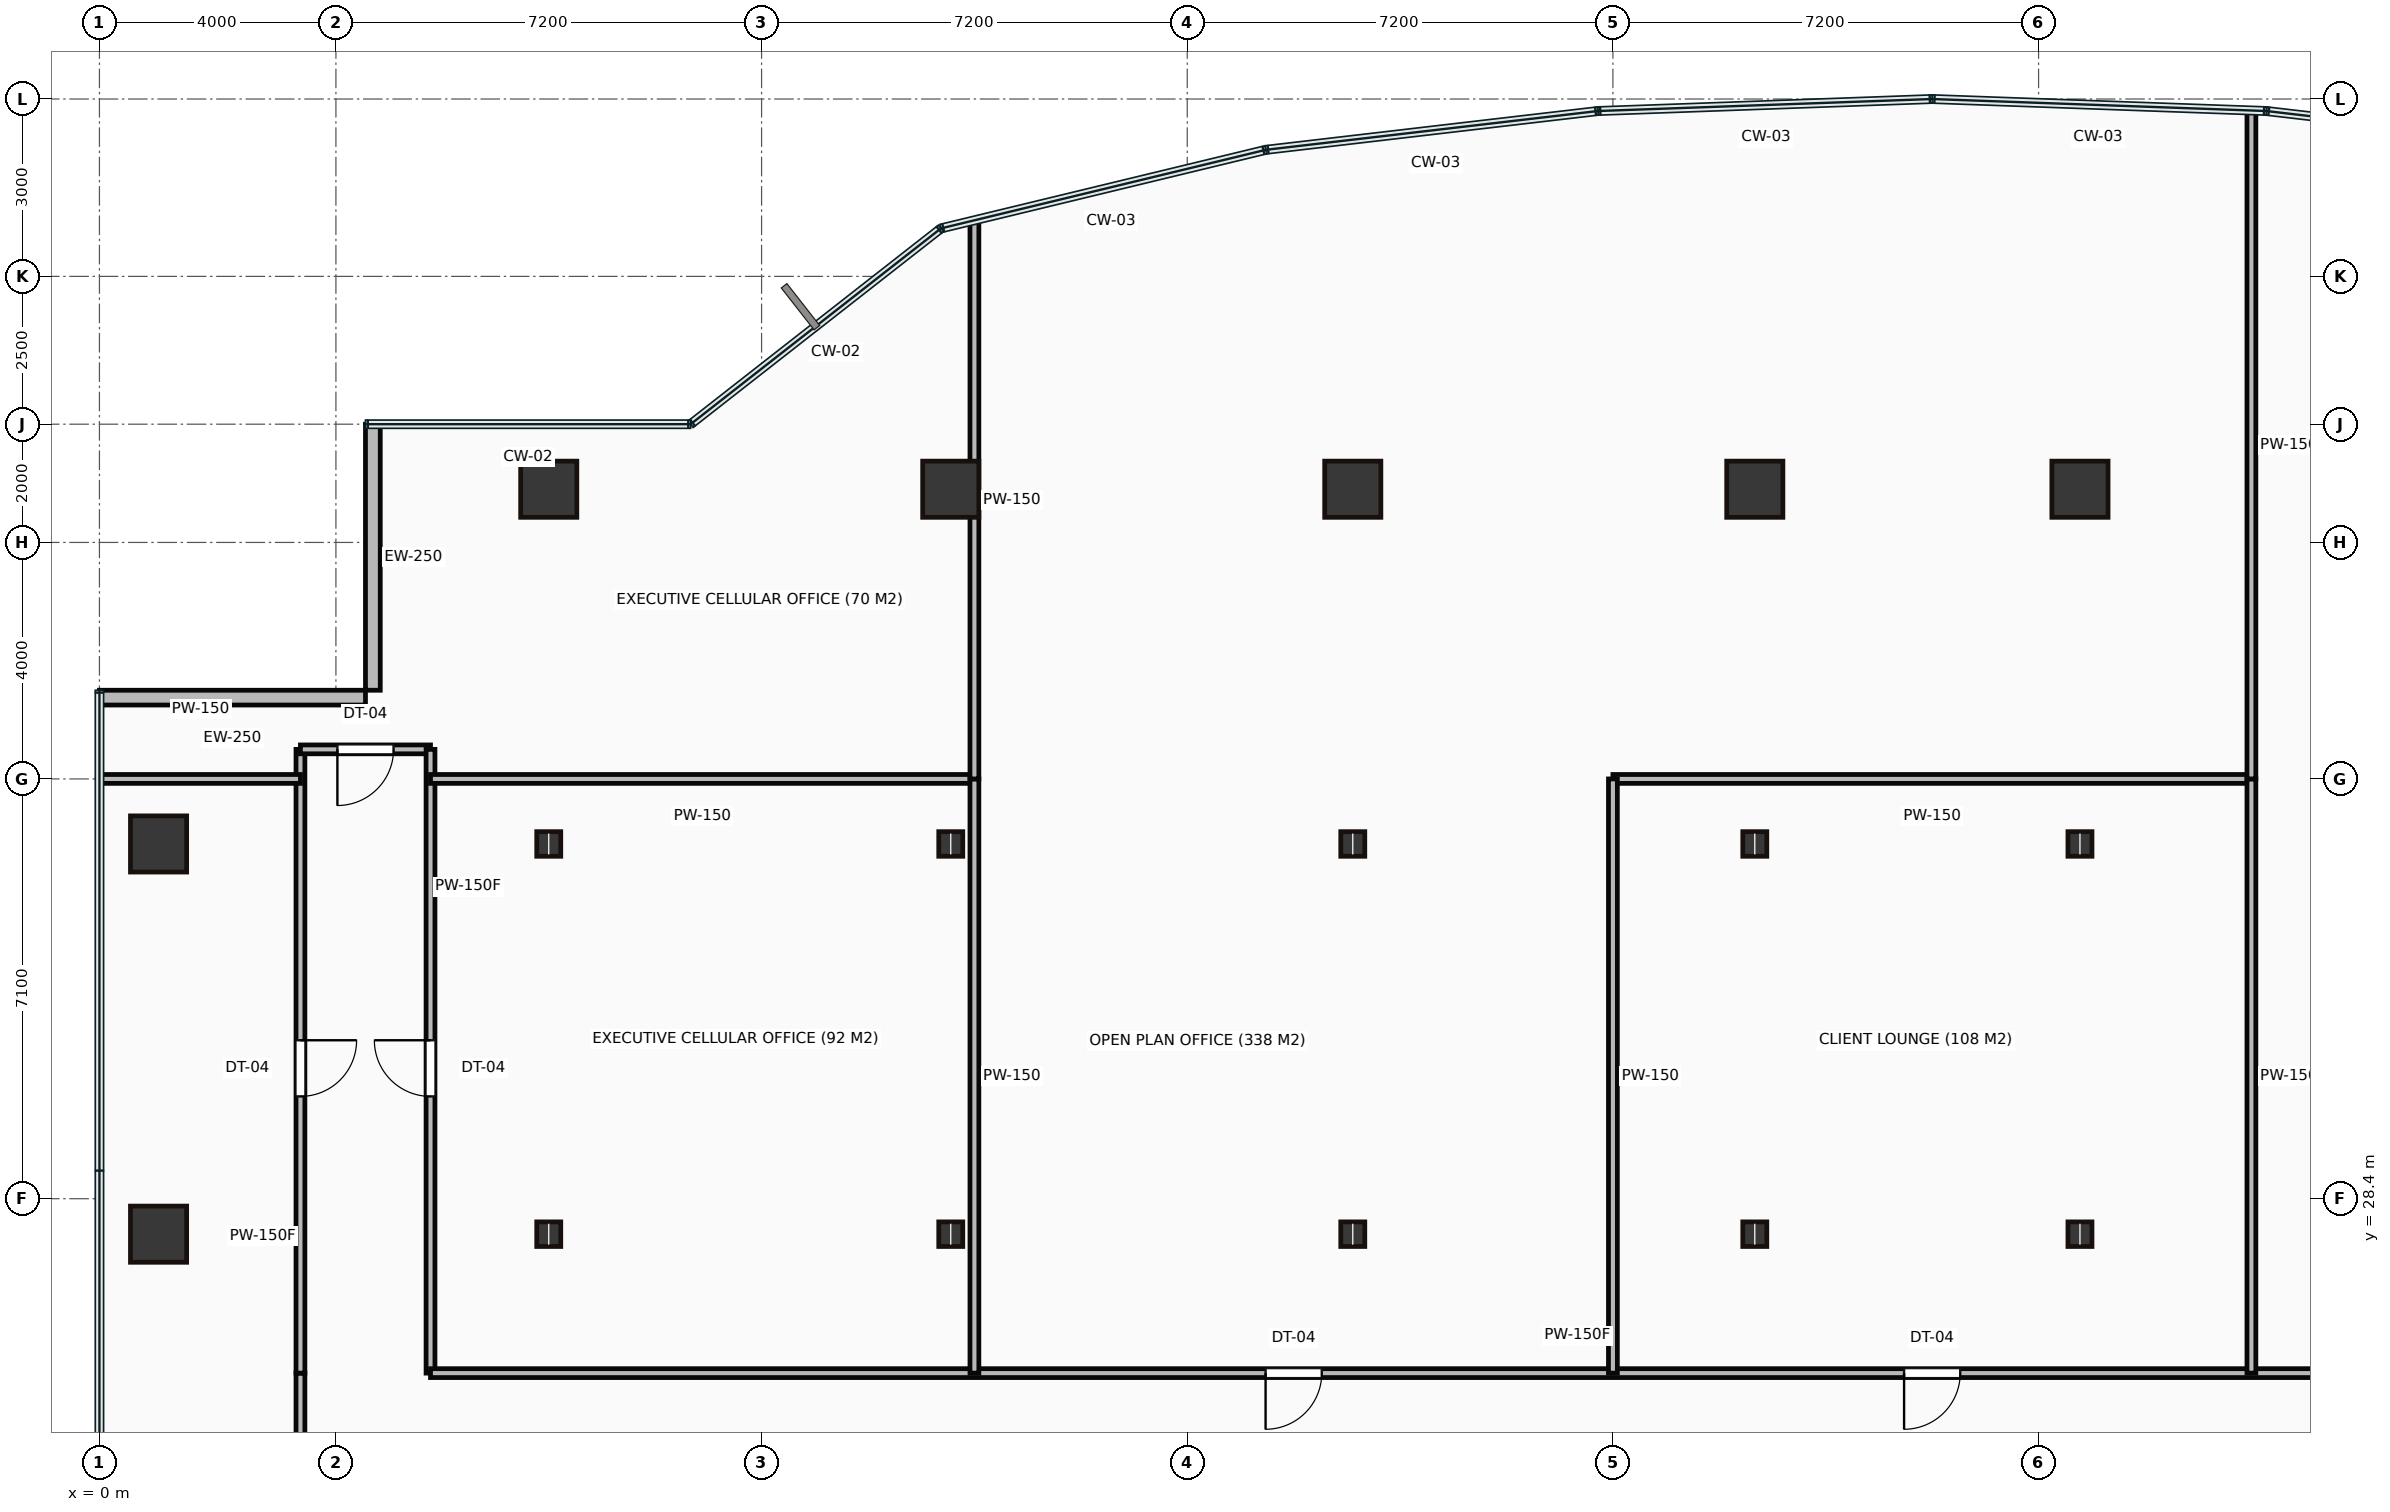
"""IFC4 building model, lengths in metres.
Left out: names, types, materials, properties, quantities, classifications, styles, units other than length and angle.
Written with IfcOpenShell. Run it as: python <this file> out.ifc"""

import sys

from ifc_helpers import new_model, si_unit, direction, frame, frame_2d, origin, origin_2d, place, context, subcontext, project, spatial, rectangle, hollow_rectangle, i_section, extrude, source, transform, mapped, element, fill, save


model = new_model("IFC4")
c1 = context("Model", 3, precision=1e-05, world=origin(), true_north=direction((0.0, 1.0)))
c2 = subcontext(c1, "Body", "Model", "MODEL_VIEW")
j1 = project(units=[si_unit("LENGTHUNIT", "METRE"), si_unit("PLANEANGLEUNIT", "RADIAN")], contexts=[c1])
p1 = place(None, origin())
s1 = spatial("IfcSite", under=j1, at=p1, CompositionType="ELEMENT")
p2 = place(p1, origin())
s2 = spatial("IfcBuilding", under=s1, at=p2, CompositionType="ELEMENT")
p3 = place(p2, frame((0.0, 0.0, 50.75)))
s3 = spatial("IfcBuildingStorey", under=s2, at=p3, CompositionType="ELEMENT", Elevation=50.75)
m1 = source(origin(), c2, "Body", "SweptSolid", [
    extrude(hollow_rectangle(XDim=0.95, YDim=0.95, WallThickness=0.045, at=origin_2d()), origin(), (0.0, 0.0, 1.0), 3.65),
])
for number, where, z_axis, x_axis in (
    (1, (1.0, 27.8, 0.0), (0.0, 0.0, 1.0), (1.0, 0.0, 0.0)),
    (2, (1.0, 34.4, 0.0), (0.0, 0.0, 1.0), (1.0, 0.0, 0.0)),
):
    element("IfcColumn", number, at=place(p3, frame(where, z_axis=z_axis, x_axis=x_axis)), inside=s3, PredefinedType="COLUMN", context=c2, shape_type="MappedRepresentation", body=[
        mapped(m1, transform((0.0, 0.0, 0.0))),
    ])
m2 = source(origin(), c2, "Body", "SweptSolid", [
    extrude(i_section(OverallWidth=0.406, OverallDepth=0.416, WebThickness=0.03, FlangeThickness=0.048, at=origin_2d()), origin(), (0.0, 0.0, 1.0), 3.65),
])
for number, where, z_axis, x_axis in (
    (3, (7.6, 27.8, 0.0), (0.0, 0.0, 1.0), (1.0, 0.0, 0.0)),
    (4, (7.6, 34.4, 0.0), (0.0, 0.0, 1.0), (1.0, 0.0, 0.0)),
):
    element("IfcColumn", number, at=place(p3, frame(where, z_axis=z_axis, x_axis=x_axis)), inside=s3, PredefinedType="COLUMN", context=c2, shape_type="MappedRepresentation", body=[
        mapped(m2, transform((0.0, 0.0, 0.0))),
    ])
p4 = place(p3, frame((7.6, 40.4, 0.0), z_axis=(0.0, 0.0, 1.0), x_axis=(1.0, 0.0, 0.0)))
e5 = element("IfcColumn", 5, at=p4, inside=s3, PredefinedType="COLUMN", context=c2, shape_type="MappedRepresentation", body=[
    mapped(m1, transform((0.0, 0.0, 0.0))),
])
for number, where, z_axis, x_axis in (
    (6, (14.4, 27.8, 0.0), (0.0, 0.0, 1.0), (1.0, 0.0, 0.0)),
    (7, (14.4, 34.4, 0.0), (0.0, 0.0, 1.0), (1.0, 0.0, 0.0)),
):
    element("IfcColumn", number, at=place(p3, frame(where, z_axis=z_axis, x_axis=x_axis)), inside=s3, PredefinedType="COLUMN", context=c2, shape_type="MappedRepresentation", body=[
        mapped(m2, transform((0.0, 0.0, 0.0))),
    ])
p5 = place(p3, frame((14.4, 40.4, 0.0), z_axis=(0.0, 0.0, 1.0), x_axis=(1.0, 0.0, 0.0)))
e8 = element("IfcColumn", 8, at=p5, inside=s3, PredefinedType="COLUMN", context=c2, shape_type="MappedRepresentation", body=[
    mapped(m1, transform((0.0, 0.0, 0.0))),
])
for number, where, z_axis, x_axis in (
    (9, (21.2, 27.8, 0.0), (0.0, 0.0, 1.0), (1.0, 0.0, 0.0)),
    (10, (21.2, 34.4, 0.0), (0.0, 0.0, 1.0), (1.0, 0.0, 0.0)),
):
    element("IfcColumn", number, at=place(p3, frame(where, z_axis=z_axis, x_axis=x_axis)), inside=s3, PredefinedType="COLUMN", context=c2, shape_type="MappedRepresentation", body=[
        mapped(m2, transform((0.0, 0.0, 0.0))),
    ])
p6 = place(p3, frame((21.2, 40.4, 0.0), z_axis=(0.0, 0.0, 1.0), x_axis=(1.0, 0.0, 0.0)))
e11 = element("IfcColumn", 11, at=p6, inside=s3, PredefinedType="COLUMN", context=c2, shape_type="MappedRepresentation", body=[
    mapped(m1, transform((0.0, 0.0, 0.0))),
])
for number, where, z_axis, x_axis in (
    (12, (28.0, 27.8, 0.0), (0.0, 0.0, 1.0), (1.0, 0.0, 0.0)),
    (13, (28.0, 34.4, 0.0), (0.0, 0.0, 1.0), (1.0, 0.0, 0.0)),
):
    element("IfcColumn", number, at=place(p3, frame(where, z_axis=z_axis, x_axis=x_axis)), inside=s3, PredefinedType="COLUMN", context=c2, shape_type="MappedRepresentation", body=[
        mapped(m2, transform((0.0, 0.0, 0.0))),
    ])
p7 = place(p3, frame((28.0, 40.4, 0.0), z_axis=(0.0, 0.0, 1.0), x_axis=(1.0, 0.0, 0.0)))
e14 = element("IfcColumn", 14, at=p7, inside=s3, PredefinedType="COLUMN", context=c2, shape_type="MappedRepresentation", body=[
    mapped(m1, transform((0.0, 0.0, 0.0))),
])
for number, where, z_axis, x_axis in (
    (15, (33.5, 27.8, 0.0), (0.0, 0.0, 1.0), (1.0, 0.0, 0.0)),
    (16, (33.5, 34.4, 0.0), (0.0, 0.0, 1.0), (1.0, 0.0, 0.0)),
):
    element("IfcColumn", number, at=place(p3, frame(where, z_axis=z_axis, x_axis=x_axis)), inside=s3, PredefinedType="COLUMN", context=c2, shape_type="MappedRepresentation", body=[
        mapped(m2, transform((0.0, 0.0, 0.0))),
    ])
p8 = place(p3, frame((33.5, 40.4, 0.0), z_axis=(0.0, 0.0, 1.0), x_axis=(1.0, 0.0, 0.0)))
e17 = element("IfcColumn", 17, at=p8, inside=s3, PredefinedType="COLUMN", context=c2, shape_type="MappedRepresentation", body=[
    mapped(m1, transform((0.0, 0.0, 0.0))),
])
m3 = source(origin(), c2, "Body", "SweptSolid", [
    extrude(rectangle(XDim=4.5, YDim=0.25, at=frame_2d((2.25, 0.0))), origin(), (0.0, 0.0, 1.0), 3.4),
])
for number, where, z_axis, x_axis in (
    (18, (4.625, 41.5, 0.0), (0.0, 0.0, 1.0), (0.0, -1.0, 0.0)),
    (19, (4.5, 36.875, 0.0), (0.0, 0.0, 1.0), (-1.0, 0.0, 0.0)),
):
    element("IfcWall", number, at=place(p3, frame(where, z_axis=z_axis, x_axis=x_axis)), inside=s3, PredefinedType="STANDARD", context=c2, shape_type="MappedRepresentation", body=[
        mapped(m3, transform((0.0, 0.0, 0.0))),
    ])
m4 = source(origin(), c2, "Body", "SweptSolid", [
    extrude(rectangle(XDim=2.05, YDim=0.15, at=frame_2d((1.025, 0.0))), origin(), (0.0, 0.0, 1.0), 3.4),
])
p9 = place(p3, frame((3.4, 23.4, 0.0), z_axis=(0.0, 0.0, 1.0), x_axis=(0.0, 1.0, 0.0)))
e20 = element("IfcWall", 20, at=p9, inside=s3, PredefinedType="PARTITIONING", context=c2, shape_type="MappedRepresentation", body=[
    mapped(m4, transform((0.0, 0.0, 0.0))),
])
m5 = source(origin(), c2, "Body", "SweptSolid", [
    extrude(rectangle(XDim=10.55, YDim=0.15, at=frame_2d((5.275, 0.0))), origin(), (0.0, 0.0, 1.0), 3.4),
])
p10 = place(p3, frame((3.4, 25.45, 0.0), z_axis=(0.0, 0.0, 1.0), x_axis=(0.0, 1.0, 0.0)))
e21 = element("IfcWall", 21, at=p10, inside=s3, PredefinedType="PARTITIONING", context=c2, shape_type="MappedRepresentation", body=[
    mapped(m5, transform((0.0, 0.0, 0.0))),
])
p11 = place(p10, frame((4.68, 0.0, 0.0)))
e22 = element("IfcOpeningElement", 22, at=p11, cuts=e21, PredefinedType="OPENING", context=c2, shape_type="SweptSolid", body=[
    extrude(rectangle(XDim=0.95, YDim=2.15, at=frame_2d((0.475, 1.075))), frame((0.0, 0.085, 0.0), z_axis=(0.0, -1.0, 0.0), x_axis=(1.0, 0.0, 0.0)), (0.0, 0.0, 1.0), 0.17),
])
m6 = source(origin(), c2, "Body", "SweptSolid", [
    extrude(rectangle(XDim=2.2, YDim=0.15, at=frame_2d((1.1, 0.0))), origin(), (0.0, 0.0, 1.0), 3.4),
])
p12 = place(p3, frame((3.4, 36.0, 0.0), z_axis=(0.0, 0.0, 1.0), x_axis=(1.0, 0.0, 0.0)))
e23 = element("IfcWall", 23, at=p12, inside=s3, PredefinedType="PARTITIONING", context=c2, shape_type="MappedRepresentation", body=[
    mapped(m6, transform((0.0, 0.0, 0.0))),
])
p13 = place(p12, frame((0.625, 0.0, 0.0)))
e24 = element("IfcOpeningElement", 24, at=p13, cuts=e23, PredefinedType="OPENING", context=c2, shape_type="SweptSolid", body=[
    extrude(rectangle(XDim=0.95, YDim=2.15, at=frame_2d((0.475, 1.075))), frame((0.0, 0.085, 0.0), z_axis=(0.0, -1.0, 0.0), x_axis=(1.0, 0.0, 0.0)), (0.0, 0.0, 1.0), 0.17),
])
p14 = place(p3, frame((5.6, 36.0, 0.0), z_axis=(0.0, 0.0, 1.0), x_axis=(0.0, -1.0, 0.0)))
e25 = element("IfcWall", 25, at=p14, inside=s3, PredefinedType="PARTITIONING", context=c2, shape_type="MappedRepresentation", body=[
    mapped(m5, transform((0.0, 0.0, 0.0))),
])
p15 = place(p14, frame((4.92, 0.0, 0.0)))
e26 = element("IfcOpeningElement", 26, at=p15, cuts=e25, PredefinedType="OPENING", context=c2, shape_type="SweptSolid", body=[
    extrude(rectangle(XDim=0.95, YDim=2.15, at=frame_2d((0.475, 1.075))), frame((0.0, 0.085, 0.0), z_axis=(0.0, -1.0, 0.0), x_axis=(1.0, 0.0, 0.0)), (0.0, 0.0, 1.0), 0.17),
])
m7 = source(origin(), c2, "Body", "SweptSolid", [
    extrude(rectangle(XDim=38.8, YDim=0.15, at=frame_2d((19.4, 0.0))), origin(), (0.0, 0.0, 1.0), 3.4),
])
p16 = place(p3, frame((5.6, 25.45, 0.0), z_axis=(0.0, 0.0, 1.0), x_axis=(1.0, 0.0, 0.0)))
e27 = element("IfcWall", 27, at=p16, inside=s3, PredefinedType="PARTITIONING", context=c2, shape_type="MappedRepresentation", body=[
    mapped(m7, transform((0.0, 0.0, 0.0))),
])
p17 = place(p16, frame((14.125, 0.0, 0.0)))
e28 = element("IfcOpeningElement", 28, at=p17, cuts=e27, PredefinedType="OPENING", context=c2, shape_type="SweptSolid", body=[
    extrude(rectangle(XDim=0.95, YDim=2.15, at=frame_2d((0.475, 1.075))), frame((0.0, 0.085, 0.0), z_axis=(0.0, -1.0, 0.0), x_axis=(1.0, 0.0, 0.0)), (0.0, 0.0, 1.0), 0.17),
])
p18 = place(p16, frame((24.925, 0.0, 0.0)))
e29 = element("IfcOpeningElement", 29, at=p18, cuts=e27, PredefinedType="OPENING", context=c2, shape_type="SweptSolid", body=[
    extrude(rectangle(XDim=0.95, YDim=2.15, at=frame_2d((0.475, 1.075))), frame((0.0, 0.085, 0.0), z_axis=(0.0, -1.0, 0.0), x_axis=(1.0, 0.0, 0.0)), (0.0, 0.0, 1.0), 0.17),
])
m8 = source(origin(), c2, "Body", "SweptSolid", [
    extrude(rectangle(XDim=3.38, YDim=0.15, at=frame_2d((1.69, 0.0))), origin(), (0.0, 0.0, 1.0), 3.4),
])
p19 = place(p3, frame((0.02, 35.5, 0.0), z_axis=(0.0, 0.0, 1.0), x_axis=(1.0, 0.0, 0.0)))
e30 = element("IfcWall", 30, at=p19, inside=s3, PredefinedType="PARTITIONING", context=c2, shape_type="MappedRepresentation", body=[
    mapped(m8, transform((0.0, 0.0, 0.0))),
])
m9 = source(origin(), c2, "Body", "SweptSolid", [
    extrude(rectangle(XDim=9.2, YDim=0.15, at=frame_2d((4.6, 0.0))), origin(), (0.0, 0.0, 1.0), 3.4),
])
p20 = place(p3, frame((14.8, 35.5, 0.0), z_axis=(0.0, 0.0, 1.0), x_axis=(-1.0, 0.0, 0.0)))
e31 = element("IfcWall", 31, at=p20, inside=s3, PredefinedType="PARTITIONING", context=c2, shape_type="MappedRepresentation", body=[
    mapped(m9, transform((0.0, 0.0, 0.0))),
])
m10 = source(origin(), c2, "Body", "SweptSolid", [
    extrude(rectangle(XDim=10.05, YDim=0.15, at=frame_2d((5.025, 0.0))), origin(), (0.0, 0.0, 1.0), 3.4),
])
p21 = place(p3, frame((14.8, 35.5, 0.0), z_axis=(0.0, 0.0, 1.0), x_axis=(0.0, -1.0, 0.0)))
e32 = element("IfcWall", 32, at=p21, inside=s3, PredefinedType="PARTITIONING", context=c2, shape_type="MappedRepresentation", body=[
    mapped(m10, transform((0.0, 0.0, 0.0))),
])
m11 = source(origin(), c2, "Body", "SweptSolid", [
    extrude(rectangle(XDim=9.428, YDim=0.15, at=frame_2d((4.714, 0.0))), origin(), (0.0, 0.0, 1.0), 3.4),
])
p22 = place(p3, frame((14.8, 44.928, 0.0), z_axis=(0.0, 0.0, 1.0), x_axis=(0.0, -1.0, 0.0)))
e33 = element("IfcWall", 33, at=p22, inside=s3, PredefinedType="PARTITIONING", context=c2, shape_type="MappedRepresentation", body=[
    mapped(m11, transform((0.0, 0.0, 0.0))),
])
m12 = source(origin(), c2, "Body", "SweptSolid", [
    extrude(rectangle(XDim=10.8, YDim=0.15, at=frame_2d((5.4, 0.0))), origin(), (0.0, 0.0, 1.0), 3.4),
])
p23 = place(p3, frame((36.4, 35.5, 0.0), z_axis=(0.0, 0.0, 1.0), x_axis=(-1.0, 0.0, 0.0)))
e34 = element("IfcWall", 34, at=p23, inside=s3, PredefinedType="PARTITIONING", context=c2, shape_type="MappedRepresentation", body=[
    mapped(m12, transform((0.0, 0.0, 0.0))),
])
for number, where, z_axis, x_axis in (
    (35, (25.6, 35.5, 0.0), (0.0, 0.0, 1.0), (0.0, -1.0, 0.0)),
    (36, (36.4, 35.5, 0.0), (0.0, 0.0, 1.0), (0.0, -1.0, 0.0)),
):
    element("IfcWall", number, at=place(p3, frame(where, z_axis=z_axis, x_axis=x_axis)), inside=s3, PredefinedType="PARTITIONING", context=c2, shape_type="MappedRepresentation", body=[
        mapped(m10, transform((0.0, 0.0, 0.0))),
    ])
m13 = source(origin(), c2, "Body", "SweptSolid", [
    extrude(rectangle(XDim=11.286, YDim=0.15, at=frame_2d((5.643, 0.0))), origin(), (0.0, 0.0, 1.0), 3.4),
])
p24 = place(p3, frame((36.4, 46.786, 0.0), z_axis=(0.0, 0.0, 1.0), x_axis=(0.0, -1.0, 0.0)))
e37 = element("IfcWall", 37, at=p24, inside=s3, PredefinedType="PARTITIONING", context=c2, shape_type="MappedRepresentation", body=[
    mapped(m13, transform((0.0, 0.0, 0.0))),
])
m14 = source(origin(), c2, "Body", "SweptSolid", [
    extrude(rectangle(XDim=0.95, YDim=2.15, at=frame_2d((0.475, 1.075))), frame((0.0, 0.025, 0.0), z_axis=(0.0, -1.0, 0.0), x_axis=(1.0, 0.0, 0.0)), (0.0, 0.0, 1.0), 0.05),
])
p25 = place(p11, origin())
e38 = element("IfcDoor", 38, at=p25, inside=s3, OperationType="SINGLE_SWING_RIGHT", PredefinedType="DOOR", context=c2, shape_type="MappedRepresentation", body=[
    mapped(m14, transform((0.0, 0.0, 0.0))),
])
fill(e22, e38)
p26 = place(p13, origin())
e39 = element("IfcDoor", 39, at=p26, inside=s3, OperationType="SINGLE_SWING_LEFT", PredefinedType="DOOR", context=c2, shape_type="MappedRepresentation", body=[
    mapped(m14, transform((0.0, 0.0, 0.0))),
])
fill(e24, e39)
p27 = place(p15, origin())
e40 = element("IfcDoor", 40, at=p27, inside=s3, OperationType="SINGLE_SWING_LEFT", PredefinedType="DOOR", context=c2, shape_type="MappedRepresentation", body=[
    mapped(m14, transform((0.0, 0.0, 0.0))),
])
fill(e26, e40)
p28 = place(p17, origin())
e41 = element("IfcDoor", 41, at=p28, inside=s3, OperationType="SINGLE_SWING_LEFT", PredefinedType="DOOR", context=c2, shape_type="MappedRepresentation", body=[
    mapped(m14, transform((0.0, 0.0, 0.0))),
])
fill(e28, e41)
p29 = place(p18, origin())
e42 = element("IfcDoor", 42, at=p29, inside=s3, OperationType="SINGLE_SWING_LEFT", PredefinedType="DOOR", context=c2, shape_type="MappedRepresentation", body=[
    mapped(m14, transform((0.0, 0.0, 0.0))),
])
fill(e29, e42)
save(model, sys.argv[1])
